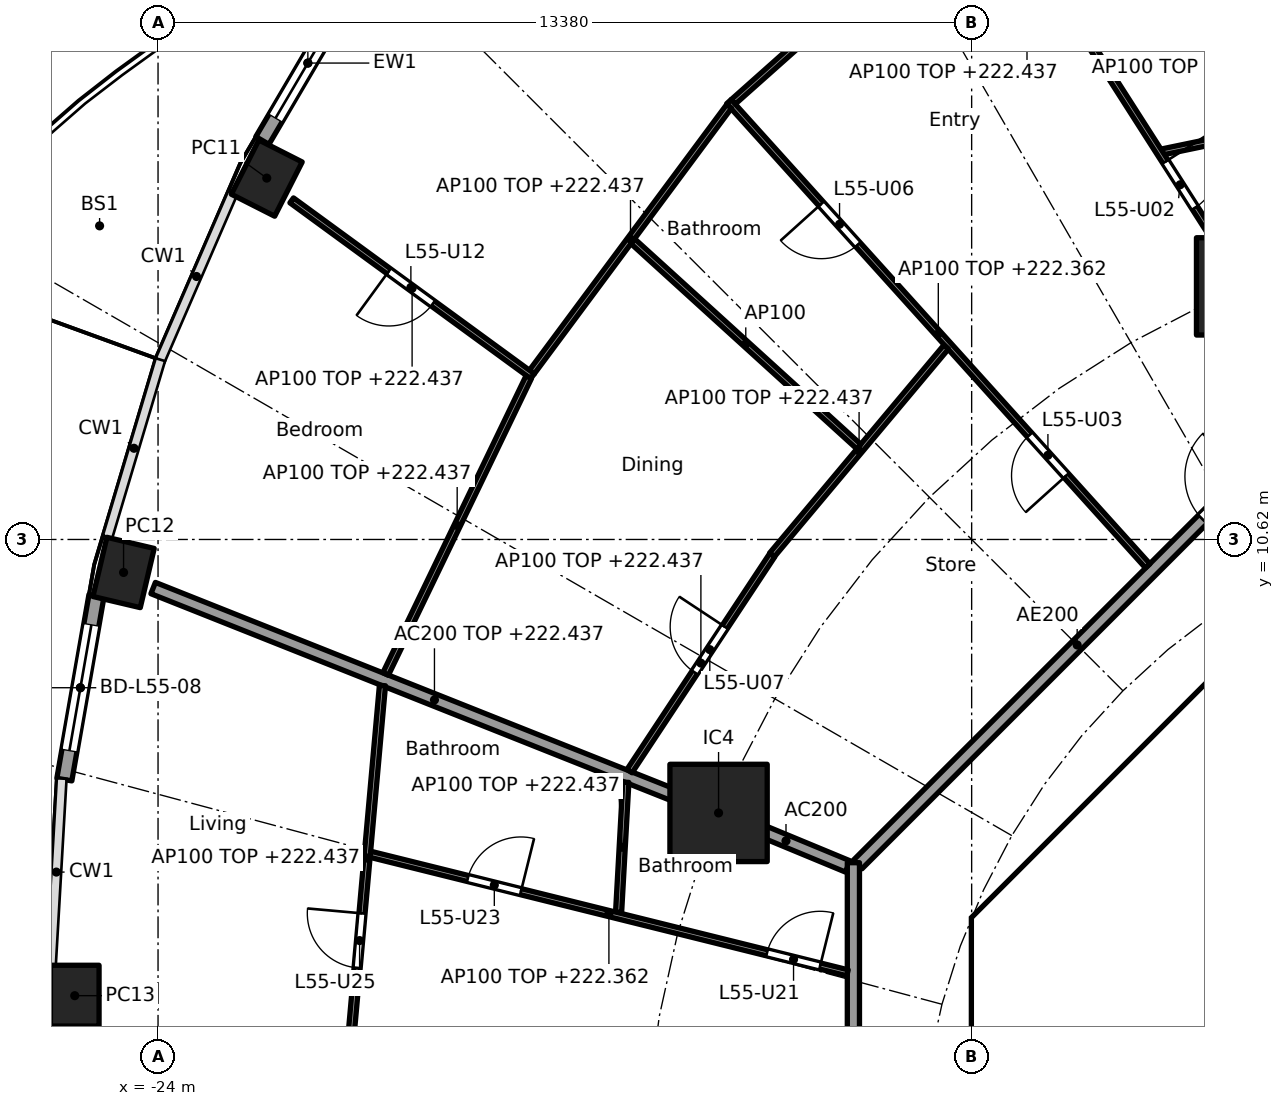
"""IFC4 building model, lengths in metres.
Left out: names, types, materials, properties, quantities, classifications, styles, units other than length and angle.
Written with IfcOpenShell. Run it as: python <this file> out.ifc"""

import sys

from ifc_helpers import new_model, si_unit, direction, frame, frame_2d, origin, origin_2d, place, context, subcontext, project, spatial, polyline, rectangle, hollow_rectangle, outline, extrude, element, fill, save


model = new_model("IFC4")
c1 = context("Model", 3, precision=1e-05, world=origin(), true_north=direction((0.0, 1.0)))
c2 = subcontext(c1, "Body", "Model", "MODEL_VIEW")
j1 = project(units=[si_unit("LENGTHUNIT", "METRE"), si_unit("PLANEANGLEUNIT", "RADIAN")], contexts=[c1])
p1 = place(None, origin())
s1 = spatial("IfcSite", under=j1, at=p1, CompositionType="ELEMENT")
p2 = place(p1, origin())
s2 = spatial("IfcBuilding", under=s1, at=p2, CompositionType="ELEMENT")
p3 = place(p2, frame((0.0, 0.0, 219.6)))
s3 = spatial("IfcBuildingStorey", under=s2, at=p3, CompositionType="ELEMENT", Elevation=219.6)
for number, where, z_axis, x_axis in (
    (1, (-22.212, 16.563, 0.0), (0.0, 0.0, 1.0), (-0.452, -0.892, 0.0)),
    (2, (-24.567, 10.077, 0.0), (0.0, 0.0, 1.0), (-0.229, -0.973, 0.0)),
    (3, (-25.37, 3.118, 0.0), (0.0, 0.0, 1.0), (0.0, -1.0, 0.0)),
):
    element("IfcColumn", number, at=place(p3, frame(where, z_axis=z_axis, x_axis=x_axis)), inside=s3, PredefinedType="COLUMN", context=c2, shape_type="SweptSolid", body=[
        extrude(hollow_rectangle(XDim=1.0, YDim=0.8, WallThickness=0.032, at=origin_2d()), origin(), (0.0, 0.0, 1.0), 3.7),
    ])
for number, where, z_axis, x_axis in (
    (4, (-6.123, 14.782, 0.0), (0.0, 0.0, 1.0), (1.0, 0.0, 0.0)),
    (5, (-14.782, 6.123, 0.0), (0.0, 0.0, 1.0), (1.0, 0.0, 0.0)),
):
    element("IfcColumn", number, at=place(p3, frame(where, z_axis=z_axis, x_axis=x_axis)), inside=s3, PredefinedType="COLUMN", context=c2, shape_type="SweptSolid", body=[
        extrude(rectangle(XDim=1.6, YDim=1.6, at=origin_2d()), origin(), (0.0, 0.0, 1.0), 3.7),
    ])
p4 = place(p3, frame((-22.284, 17.181, 0.0), z_axis=(0.0, 0.0, 1.0), x_axis=(0.506330171469, 0.862339699573, 0.0)))
e6 = element("IfcWall", 6, at=p4, inside=s3, PredefinedType="SOLIDWALL", context=c2, shape_type="SweptSolid", body=[
    extrude(rectangle(XDim=2.954, YDim=0.25, at=frame_2d((1.477, 0.0))), origin(), (0.0, 0.0, 1.0), 3.44),
])
p5 = place(p4, frame((0.427, 0.0, 0.0)))
e7 = element("IfcOpeningElement", 7, at=p5, cuts=e6, PredefinedType="OPENING", context=c2, shape_type="SweptSolid", body=[
    extrude(rectangle(XDim=2.1, YDim=2.4, at=frame_2d((1.05, 1.2))), frame((0.0, 0.135, 0.0), z_axis=(0.0, -1.0, 0.0), x_axis=(1.0, 0.0, 0.0)), (0.0, 0.0, 1.0), 0.27),
])
p6 = place(p3, frame((-25.541, 6.671, 0.0), z_axis=(0.0, 0.0, 1.0), x_axis=(0.172254823677, 0.985052422828, 0.0)))
e8 = element("IfcWall", 8, at=p6, inside=s3, PredefinedType="SOLIDWALL", context=c2, shape_type="SweptSolid", body=[
    extrude(rectangle(XDim=3.067, YDim=0.25, at=frame_2d((1.534, 0.0))), origin(), (0.0, 0.0, 1.0), 3.44),
])
p7 = place(p6, frame((0.484, 0.0, 0.0)))
e9 = element("IfcOpeningElement", 9, at=p7, cuts=e8, PredefinedType="OPENING", context=c2, shape_type="SweptSolid", body=[
    extrude(rectangle(XDim=2.1, YDim=2.4, at=frame_2d((1.05, 1.2))), frame((0.0, 0.135, 0.0), z_axis=(0.0, -1.0, 0.0), x_axis=(1.0, 0.0, 0.0)), (0.0, 0.0, 1.0), 0.27),
])
p8 = place(p3, frame((-4.613, 9.988, 0.0), z_axis=(0.0, 0.0, 1.0), x_axis=(-0.707106781187, -0.707106781187, 0.0)))
e10 = element("IfcWall", 10, at=p8, inside=s3, PredefinedType="SHEAR", context=c2, shape_type="SweptSolid", body=[
    extrude(rectangle(XDim=7.602, YDim=0.6, at=frame_2d((3.801, 0.0))), origin(), (0.0, 0.0, 1.0), 3.44),
])
p9 = place(p8, frame((0.351, 0.0, 0.0)))
e11 = element("IfcOpeningElement", 11, at=p9, cuts=e10, PredefinedType="OPENING", context=c2, shape_type="SweptSolid", body=[
    extrude(rectangle(XDim=1.1, YDim=2.1, at=frame_2d((0.55, 1.05))), frame((0.0, 0.31, 0.0), z_axis=(0.0, -1.0, 0.0), x_axis=(1.0, 0.0, 0.0)), (0.0, 0.0, 1.0), 0.62),
])
p10 = place(p3, frame((-10.325, 3.801, 0.0), z_axis=(0.0, 0.0, 1.0), x_axis=(0.0, -1.0, 0.0)))
e12 = element("IfcWall", 12, at=p10, inside=s3, PredefinedType="SHEAR", context=c2, shape_type="SweptSolid", body=[
    extrude(rectangle(XDim=7.602, YDim=0.6, at=frame_2d((3.801, 0.0))), origin(), (0.0, 0.0, 1.0), 3.44),
])
p11 = place(p10, frame((0.651, 0.0, 0.0)))
e13 = element("IfcOpeningElement", 13, at=p11, cuts=e12, PredefinedType="OPENING", context=c2, shape_type="SweptSolid", body=[
    extrude(rectangle(XDim=1.5, YDim=2.1, at=frame_2d((0.75, 1.05))), frame((0.0, 0.31, 0.0), z_axis=(0.0, -1.0, 0.0), x_axis=(1.0, 0.0, 0.0)), (0.0, 0.0, 1.0), 0.62),
])
p12 = place(p10, frame((5.451, 0.0, 0.0)))
e14 = element("IfcOpeningElement", 14, at=p12, cuts=e12, PredefinedType="OPENING", context=c2, shape_type="SweptSolid", body=[
    extrude(rectangle(XDim=1.5, YDim=2.1, at=frame_2d((0.75, 1.05))), frame((0.0, 0.31, 0.0), z_axis=(0.0, -1.0, 0.0), x_axis=(1.0, 0.0, 0.0)), (0.0, 0.0, 1.0), 0.62),
])
p13 = place(p3, origin())
e15 = element("IfcWall", 15, at=p13, inside=s3, PredefinedType="SHEAR", context=c2, shape_type="SweptSolid", body=[
    extrude(outline(polyline([(-10.2, 4.825), (-9.776, 4.401), (-10.025, 4.152), (-10.025, 3.801), (-10.625, 3.801), (-10.625, 4.401), (-10.2, 4.825)])), origin(), (0.0, 0.0, 1.0), 3.44),
])
p14 = place(p3, frame((-10.025, 4.0, 0.0), z_axis=(0.0, 0.0, 1.0), x_axis=(1.0, 0.0, 0.0)))
e16 = element("IfcWall", 16, at=p14, inside=s3, PredefinedType="PARTITIONING", context=c2, shape_type="SweptSolid", body=[
    extrude(rectangle(XDim=3.325, YDim=0.2, at=frame_2d((1.662, 0.0))), origin(), (0.0, 0.0, 1.0), 3.44),
])
p15 = place(p3, frame((-8.301, 5.8, 0.0), z_axis=(0.0, 0.0, 1.0), x_axis=(1.0, 0.0, 0.0)))
e17 = element("IfcWall", 17, at=p15, inside=s3, PredefinedType="PARTITIONING", context=c2, shape_type="SweptSolid", body=[
    extrude(rectangle(XDim=2.026, YDim=0.15, at=frame_2d((1.013, 0.0))), origin(), (0.0, 0.0, 1.0), 3.44),
])
p16 = place(p3, frame((-12.657, 5.243, 0.0), z_axis=(0.0, 0.0, 1.0), x_axis=(-0.923859888513, 0.38273085373, 0.0)))
e18 = element("IfcWall", 18, at=p16, inside=s3, PredefinedType="PARTITIONING", context=c2, shape_type="SweptSolid", body=[
    extrude(rectangle(XDim=2.199, YDim=0.2, at=frame_2d((1.1, 0.0))), origin(), (0.0, 0.0, 1.0), 3.44),
])
p17 = place(p3, frame((-14.829, 6.141, 0.0), z_axis=(0.0, 0.0, 1.0), x_axis=(-0.929202069098, 0.36957206981, 0.0)))
e19 = element("IfcWall", 19, at=p17, inside=s3, PredefinedType="PARTITIONING", context=c2, shape_type="SweptSolid", body=[
    extrude(rectangle(XDim=9.957, YDim=0.2, at=frame_2d((4.978, 0.0))), origin(), (0.0, 0.0, 1.0), 2.837),
])
p18 = place(p3, frame((-5.275, 12.494, 0.0), z_axis=(0.0, 0.0, 1.0), x_axis=(-0.707106781187, -0.707106781187, 0.0)))
e20 = element("IfcWall", 20, at=p18, inside=s3, PredefinedType="PARTITIONING", context=c2, shape_type="SweptSolid", body=[
    extrude(rectangle(XDim=10.209, YDim=0.2, at=frame_2d((5.104, 0.0))), origin(), (0.0, 0.0, 1.0), 3.44),
])
p19 = place(p18, frame((1.185, 0.0, 0.0)))
e21 = element("IfcOpeningElement", 21, at=p19, cuts=e20, PredefinedType="OPENING", context=c2, shape_type="SweptSolid", body=[
    extrude(rectangle(XDim=1.0, YDim=2.1, at=frame_2d((0.5, 1.05))), frame((0.0, 0.11, 0.0), z_axis=(0.0, -1.0, 0.0), x_axis=(1.0, 0.0, 0.0)), (0.0, 0.0, 1.0), 0.22),
])
p20 = place(p3, frame((-12.565, 5.304, 0.0), z_axis=(0.0, 0.0, 1.0), x_axis=(0.0, -1.0, 0.0)))
e22 = element("IfcWall", 22, at=p20, inside=s3, PredefinedType="PARTITIONING", context=c2, shape_type="SweptSolid", body=[
    extrude(rectangle(XDim=10.409, YDim=0.2, at=frame_2d((5.205, 0.0))), origin(), (0.0, 0.0, 1.0), 3.44),
])
p21 = place(p20, frame((3.07, 0.0, 0.0)))
e23 = element("IfcOpeningElement", 23, at=p21, cuts=e22, PredefinedType="OPENING", context=c2, shape_type="SweptSolid", body=[
    extrude(rectangle(XDim=1.0, YDim=2.1, at=frame_2d((0.5, 1.05))), frame((0.0, 0.11, 0.0), z_axis=(0.0, -1.0, 0.0), x_axis=(1.0, 0.0, 0.0)), (0.0, 0.0, 1.0), 0.22),
])
p22 = place(p3, frame((-4.215, 17.62, 0.0), z_axis=(0.0, 0.0, 1.0), x_axis=(-0.303985237897, 0.952676742206, 0.0)))
e24 = element("IfcWall", 24, at=p22, inside=s3, PredefinedType="PARTITIONING", context=c2, shape_type="SweptSolid", body=[
    extrude(rectangle(XDim=11.499, YDim=0.1, at=frame_2d((5.75, 0.0))), origin(), (0.0, 0.0, 1.0), 2.837),
])
p23 = place(p22, frame((2.457, 0.0, 0.0)))
e25 = element("IfcOpeningElement", 25, at=p23, cuts=e24, PredefinedType="OPENING", context=c2, shape_type="SweptSolid", body=[
    extrude(rectangle(XDim=0.9, YDim=2.1, at=frame_2d((0.45, 1.05))), frame((0.0, 0.06, 0.0), z_axis=(0.0, -1.0, 0.0), x_axis=(1.0, 0.0, 0.0)), (0.0, 0.0, 1.0), 0.12),
])
p24 = place(p22, frame((8.181, 0.0, 0.0)))
e26 = element("IfcOpeningElement", 26, at=p24, cuts=e24, PredefinedType="OPENING", context=c2, shape_type="SweptSolid", body=[
    extrude(rectangle(XDim=0.9, YDim=2.1, at=frame_2d((0.45, 1.05))), frame((0.0, 0.06, 0.0), z_axis=(0.0, -1.0, 0.0), x_axis=(1.0, 0.0, 0.0)), (0.0, 0.0, 1.0), 0.12),
])
p25 = place(p3, frame((-4.28, 17.657, 0.0), z_axis=(0.0, 0.0, 1.0), x_axis=(-0.979205232861, -0.202872156637, 0.0)))
e27 = element("IfcWall", 27, at=p25, inside=s3, PredefinedType="PARTITIONING", context=c2, shape_type="SweptSolid", body=[
    extrude(rectangle(XDim=3.271, YDim=0.1, at=frame_2d((1.635, 0.0))), origin(), (0.0, 0.0, 1.0), 2.837),
])
p26 = place(p3, frame((-6.15, 14.824, 0.0), z_axis=(0.0, 0.0, 1.0), x_axis=(-0.538870687577, 0.842388498301, 0.0)))
e28 = element("IfcWall", 28, at=p26, inside=s3, PredefinedType="PARTITIONING", context=c2, shape_type="SweptSolid", body=[
    extrude(rectangle(XDim=13.213, YDim=0.1, at=frame_2d((6.606, 0.0))), origin(), (0.0, 0.0, 1.0), 2.837),
])
p27 = place(p26, frame((1.483, 0.0, 0.0)))
e29 = element("IfcOpeningElement", 29, at=p27, cuts=e28, PredefinedType="OPENING", context=c2, shape_type="SweptSolid", body=[
    extrude(rectangle(XDim=0.9, YDim=2.1, at=frame_2d((0.45, 1.05))), frame((0.0, 0.06, 0.0), z_axis=(0.0, -1.0, 0.0), x_axis=(1.0, 0.0, 0.0)), (0.0, 0.0, 1.0), 0.12),
])
p28 = place(p3, frame((-10.45, 21.455, 0.0), z_axis=(0.0, 0.0, 1.0), x_axis=(-0.747150931973, -0.66465441009, 0.0)))
e30 = element("IfcWall", 30, at=p28, inside=s3, PredefinedType="PARTITIONING", context=c2, shape_type="SweptSolid", body=[
    extrude(rectangle(XDim=5.475, YDim=0.1, at=frame_2d((2.737, 0.0))), origin(), (0.0, 0.0, 1.0), 2.837),
])
p29 = place(p28, frame((2.288, 0.0, 0.0)))
e31 = element("IfcOpeningElement", 31, at=p29, cuts=e30, PredefinedType="OPENING", context=c2, shape_type="SweptSolid", body=[
    extrude(rectangle(XDim=0.9, YDim=2.1, at=frame_2d((0.45, 1.05))), frame((0.0, 0.06, 0.0), z_axis=(0.0, -1.0, 0.0), x_axis=(1.0, 0.0, 0.0)), (0.0, 0.0, 1.0), 0.12),
])
p30 = place(p3, frame((-7.725, 10.186, 0.0), z_axis=(0.0, 0.0, 1.0), x_axis=(-0.669819599194, 0.742523874725, 0.0)))
e32 = element("IfcWall", 32, at=p30, inside=s3, PredefinedType="PARTITIONING", context=c2, shape_type="SweptSolid", body=[
    extrude(rectangle(XDim=10.282, YDim=0.1, at=frame_2d((5.141, 0.0))), origin(), (0.0, 0.0, 1.0), 2.762),
])
p31 = place(p30, frame((2.0, 0.0, 0.0)))
e33 = element("IfcOpeningElement", 33, at=p31, cuts=e32, PredefinedType="OPENING", context=c2, shape_type="SweptSolid", body=[
    extrude(rectangle(XDim=0.9, YDim=2.1, at=frame_2d((0.45, 1.05))), frame((0.0, 0.06, 0.0), z_axis=(0.0, -1.0, 0.0), x_axis=(1.0, 0.0, 0.0)), (0.0, 0.0, 1.0), 0.12),
])
p32 = place(p30, frame((7.116, 0.0, 0.0)))
e34 = element("IfcOpeningElement", 34, at=p32, cuts=e32, PredefinedType="OPENING", context=c2, shape_type="SweptSolid", body=[
    extrude(rectangle(XDim=0.9, YDim=2.1, at=frame_2d((0.45, 1.05))), frame((0.0, 0.06, 0.0), z_axis=(0.0, -1.0, 0.0), x_axis=(1.0, 0.0, 0.0)), (0.0, 0.0, 1.0), 0.12),
])
p33 = place(p3, frame((-11.039, 13.785, 0.0), z_axis=(0.0, 0.0, 1.0), x_axis=(-0.642254625966, -0.766491353784, 0.0)))
e35 = element("IfcWall", 35, at=p33, inside=s3, PredefinedType="PARTITIONING", context=c2, shape_type="SweptSolid", body=[
    extrude(rectangle(XDim=4.461, YDim=0.1, at=frame_2d((2.23, 0.0))), origin(), (0.0, 0.0, 1.0), 2.837),
])
p34 = place(p3, frame((-14.608, 17.743, 0.0), z_axis=(0.0, 0.0, 1.0), x_axis=(-0.596174489482, -0.8028548923, 0.0)))
e36 = element("IfcWall", 36, at=p34, inside=s3, PredefinedType="PARTITIONING", context=c2, shape_type="SweptSolid", body=[
    extrude(rectangle(XDim=5.442, YDim=0.1, at=frame_2d((2.721, 0.0))), origin(), (0.0, 0.0, 1.0), 2.837),
])
p35 = place(p3, frame((-12.476, 12.147, 0.0), z_axis=(0.0, 0.0, 1.0), x_axis=(-0.740129203525, 0.672464692077, 0.0)))
e37 = element("IfcWall", 37, at=p35, inside=s3, PredefinedType="PARTITIONING", context=c2, shape_type="SweptSolid", body=[
    extrude(rectangle(XDim=5.022, YDim=0.1, at=frame_2d((2.511, 0.0))), origin(), (0.0, 0.0, 1.0), 3.44),
])
p36 = place(p3, frame((-13.899, 10.363, 0.0), z_axis=(0.0, 0.0, 1.0), x_axis=(-0.551267958114, -0.834328255758, 0.0)))
e38 = element("IfcWall", 38, at=p36, inside=s3, PredefinedType="PARTITIONING", context=c2, shape_type="SweptSolid", body=[
    extrude(rectangle(XDim=4.257, YDim=0.1, at=frame_2d((2.129, 0.0))), origin(), (0.0, 0.0, 1.0), 2.837),
])
p37 = place(p36, frame((1.413, 0.0, 0.0)))
e39 = element("IfcOpeningElement", 39, at=p37, cuts=e38, PredefinedType="OPENING", context=c2, shape_type="SweptSolid", body=[
    extrude(rectangle(XDim=0.9, YDim=2.1, at=frame_2d((0.45, 1.05))), frame((0.0, 0.06, 0.0), z_axis=(0.0, -1.0, 0.0), x_axis=(1.0, 0.0, 0.0)), (0.0, 0.0, 1.0), 0.12),
])
p38 = place(p3, frame((-17.842, 13.304, 0.0), z_axis=(0.0, 0.0, 1.0), x_axis=(-0.807541617862, 0.589810592835, 0.0)))
e40 = element("IfcWall", 40, at=p38, inside=s3, PredefinedType="PARTITIONING", context=c2, shape_type="SweptSolid", body=[
    extrude(rectangle(XDim=4.903, YDim=0.1, at=frame_2d((2.452, 0.0))), origin(), (0.0, 0.0, 1.0), 2.837),
])
p39 = place(p38, frame((2.027, 0.0, 0.0)))
e41 = element("IfcOpeningElement", 41, at=p39, cuts=e40, PredefinedType="OPENING", context=c2, shape_type="SweptSolid", body=[
    extrude(rectangle(XDim=0.9, YDim=2.1, at=frame_2d((0.45, 1.05))), frame((0.0, 0.06, 0.0), z_axis=(0.0, -1.0, 0.0), x_axis=(1.0, 0.0, 0.0)), (0.0, 0.0, 1.0), 0.12),
])
p40 = place(p3, frame((-17.904, 13.289, 0.0), z_axis=(0.0, 0.0, 1.0), x_axis=(-0.43429918566, -0.900768681369, 0.0)))
e42 = element("IfcWall", 42, at=p40, inside=s3, PredefinedType="PARTITIONING", context=c2, shape_type="SweptSolid", body=[
    extrude(rectangle(XDim=5.418, YDim=0.1, at=frame_2d((2.709, 0.0))), origin(), (0.0, 0.0, 1.0), 2.837),
])
p41 = place(p3, frame((-16.307, 6.627, 0.0), z_axis=(0.0, 0.0, 1.0), x_axis=(-0.055608865939, -0.998452629837, 0.0)))
e43 = element("IfcWall", 43, at=p41, inside=s3, PredefinedType="PARTITIONING", context=c2, shape_type="SweptSolid", body=[
    extrude(rectangle(XDim=2.143, YDim=0.1, at=frame_2d((1.071, 0.0))), origin(), (0.0, 0.0, 1.0), 2.837),
])
p42 = place(p3, frame((-20.31, 8.218, 0.0), z_axis=(0.0, 0.0, 1.0), x_axis=(-0.089284106956, -0.996006198899, 0.0)))
e44 = element("IfcWall", 44, at=p42, inside=s3, PredefinedType="PARTITIONING", context=c2, shape_type="SweptSolid", body=[
    extrude(rectangle(XDim=5.698, YDim=0.1, at=frame_2d((2.849, 0.0))), origin(), (0.0, 0.0, 1.0), 2.837),
])
p43 = place(p42, frame((3.761, 0.0, 0.0)))
e45 = element("IfcOpeningElement", 45, at=p43, cuts=e44, PredefinedType="OPENING", context=c2, shape_type="SweptSolid", body=[
    extrude(rectangle(XDim=0.9, YDim=2.1, at=frame_2d((0.45, 1.05))), frame((0.0, 0.06, 0.0), z_axis=(0.0, -1.0, 0.0), x_axis=(1.0, 0.0, 0.0)), (0.0, 0.0, 1.0), 0.12),
])
p44 = place(p3, frame((-12.662, 3.494, 0.0), z_axis=(0.0, 0.0, 1.0), x_axis=(-0.970505526029, 0.241078874951, 0.0)))
e46 = element("IfcWall", 46, at=p44, inside=s3, PredefinedType="PARTITIONING", context=c2, shape_type="SweptSolid", body=[
    extrude(rectangle(XDim=8.085, YDim=0.1, at=frame_2d((4.043, 0.0))), origin(), (0.0, 0.0, 1.0), 2.762),
])
p45 = place(p44, frame((0.464, 0.0, 0.0)))
e47 = element("IfcOpeningElement", 47, at=p45, cuts=e46, PredefinedType="OPENING", context=c2, shape_type="SweptSolid", body=[
    extrude(rectangle(XDim=0.9, YDim=2.1, at=frame_2d((0.45, 1.05))), frame((0.0, 0.06, 0.0), z_axis=(0.0, -1.0, 0.0), x_axis=(1.0, 0.0, 0.0)), (0.0, 0.0, 1.0), 0.12),
])
p46 = place(p44, frame((5.535, 0.0, 0.0)))
e48 = element("IfcOpeningElement", 48, at=p46, cuts=e46, PredefinedType="OPENING", context=c2, shape_type="SweptSolid", body=[
    extrude(rectangle(XDim=0.9, YDim=2.1, at=frame_2d((0.45, 1.05))), frame((0.0, 0.06, 0.0), z_axis=(0.0, -1.0, 0.0), x_axis=(1.0, 0.0, 0.0)), (0.0, 0.0, 1.0), 0.12),
])
p47 = place(p5, origin())
e49 = element("IfcDoor", 49, at=p47, inside=s3, OperationType="SLIDING_TO_LEFT", PredefinedType="DOOR", context=c2, shape_type="SweptSolid", body=[
    extrude(rectangle(XDim=2.1, YDim=2.4, at=frame_2d((1.05, 1.2))), frame((0.0, 0.025, 0.0), z_axis=(0.0, -1.0, 0.0), x_axis=(1.0, 0.0, 0.0)), (0.0, 0.0, 1.0), 0.05),
])
fill(e7, e49)
p48 = place(p7, origin())
e50 = element("IfcDoor", 50, at=p48, inside=s3, OperationType="SLIDING_TO_LEFT", PredefinedType="DOOR", context=c2, shape_type="SweptSolid", body=[
    extrude(rectangle(XDim=2.1, YDim=2.4, at=frame_2d((1.05, 1.2))), frame((0.0, 0.025, 0.0), z_axis=(0.0, -1.0, 0.0), x_axis=(1.0, 0.0, 0.0)), (0.0, 0.0, 1.0), 0.05),
])
fill(e9, e50)
p49 = place(p11, origin())
e51 = element("IfcDoor", 51, at=p49, inside=s3, OperationType="DOUBLE_DOOR_SINGLE_SWING", PredefinedType="DOOR", context=c2, shape_type="SweptSolid", body=[
    extrude(rectangle(XDim=1.5, YDim=2.1, at=frame_2d((0.75, 1.05))), frame((0.0, 0.025, 0.0), z_axis=(0.0, -1.0, 0.0), x_axis=(1.0, 0.0, 0.0)), (0.0, 0.0, 1.0), 0.05),
])
fill(e13, e51)
p50 = place(p19, frame((1.0, 0.0, 0.0), x_axis=(-1.0, 0.0, 0.0)))
e52 = element("IfcDoor", 52, at=p50, inside=s3, OperationType="SINGLE_SWING_RIGHT", PredefinedType="DOOR", context=c2, shape_type="SweptSolid", body=[
    extrude(rectangle(XDim=1.0, YDim=2.1, at=frame_2d((0.5, 1.05))), frame((0.0, 0.025, 0.0), z_axis=(0.0, -1.0, 0.0), x_axis=(1.0, 0.0, 0.0)), (0.0, 0.0, 1.0), 0.05),
])
fill(e21, e52)
p51 = place(p27, frame((0.9, 0.0, 0.0), x_axis=(-1.0, 0.0, 0.0)))
e53 = element("IfcDoor", 53, at=p51, inside=s3, OperationType="SINGLE_SWING_LEFT", PredefinedType="DOOR", context=c2, shape_type="SweptSolid", body=[
    extrude(rectangle(XDim=0.9, YDim=2.1, at=frame_2d((0.45, 1.05))), frame((0.0, 0.025, 0.0), z_axis=(0.0, -1.0, 0.0), x_axis=(1.0, 0.0, 0.0)), (0.0, 0.0, 1.0), 0.05),
])
fill(e29, e53)
p52 = place(p31, origin())
e54 = element("IfcDoor", 54, at=p52, inside=s3, OperationType="SINGLE_SWING_LEFT", PredefinedType="DOOR", context=c2, shape_type="SweptSolid", body=[
    extrude(rectangle(XDim=0.9, YDim=2.1, at=frame_2d((0.45, 1.05))), frame((0.0, 0.025, 0.0), z_axis=(0.0, -1.0, 0.0), x_axis=(1.0, 0.0, 0.0)), (0.0, 0.0, 1.0), 0.05),
])
fill(e33, e54)
p53 = place(p32, origin())
e55 = element("IfcDoor", 55, at=p53, inside=s3, OperationType="SINGLE_SWING_RIGHT", PredefinedType="DOOR", context=c2, shape_type="SweptSolid", body=[
    extrude(rectangle(XDim=0.9, YDim=2.1, at=frame_2d((0.45, 1.05))), frame((0.0, 0.025, 0.0), z_axis=(0.0, -1.0, 0.0), x_axis=(1.0, 0.0, 0.0)), (0.0, 0.0, 1.0), 0.05),
])
fill(e34, e55)
p54 = place(p37, frame((0.9, 0.0, 0.0), x_axis=(-1.0, 0.0, 0.0)))
e56 = element("IfcDoor", 56, at=p54, inside=s3, OperationType="SINGLE_SWING_RIGHT", PredefinedType="DOOR", context=c2, shape_type="SweptSolid", body=[
    extrude(rectangle(XDim=0.9, YDim=2.1, at=frame_2d((0.45, 1.05))), frame((0.0, 0.025, 0.0), z_axis=(0.0, -1.0, 0.0), x_axis=(1.0, 0.0, 0.0)), (0.0, 0.0, 1.0), 0.05),
])
fill(e39, e56)
p55 = place(p39, origin())
e57 = element("IfcDoor", 57, at=p55, inside=s3, OperationType="SINGLE_SWING_RIGHT", PredefinedType="DOOR", context=c2, shape_type="SweptSolid", body=[
    extrude(rectangle(XDim=0.9, YDim=2.1, at=frame_2d((0.45, 1.05))), frame((0.0, 0.025, 0.0), z_axis=(0.0, -1.0, 0.0), x_axis=(1.0, 0.0, 0.0)), (0.0, 0.0, 1.0), 0.05),
])
fill(e41, e57)
p56 = place(p45, frame((0.9, 0.0, 0.0), x_axis=(-1.0, 0.0, 0.0)))
e58 = element("IfcDoor", 58, at=p56, inside=s3, OperationType="SINGLE_SWING_RIGHT", PredefinedType="DOOR", context=c2, shape_type="SweptSolid", body=[
    extrude(rectangle(XDim=0.9, YDim=2.1, at=frame_2d((0.45, 1.05))), frame((0.0, 0.025, 0.0), z_axis=(0.0, -1.0, 0.0), x_axis=(1.0, 0.0, 0.0)), (0.0, 0.0, 1.0), 0.05),
])
fill(e47, e58)
p57 = place(p46, frame((0.9, 0.0, 0.0), x_axis=(-1.0, 0.0, 0.0)))
e59 = element("IfcDoor", 59, at=p57, inside=s3, OperationType="SINGLE_SWING_RIGHT", PredefinedType="DOOR", context=c2, shape_type="SweptSolid", body=[
    extrude(rectangle(XDim=0.9, YDim=2.1, at=frame_2d((0.45, 1.05))), frame((0.0, 0.025, 0.0), z_axis=(0.0, -1.0, 0.0), x_axis=(1.0, 0.0, 0.0)), (0.0, 0.0, 1.0), 0.05),
])
fill(e48, e59)
p58 = place(p43, frame((0.9, 0.0, 0.0), x_axis=(-1.0, 0.0, 0.0)))
e60 = element("IfcDoor", 60, at=p58, inside=s3, OperationType="SINGLE_SWING_RIGHT", PredefinedType="DOOR", context=c2, shape_type="SweptSolid", body=[
    extrude(rectangle(XDim=0.9, YDim=2.1, at=frame_2d((0.45, 1.05))), frame((0.0, 0.025, 0.0), z_axis=(0.0, -1.0, 0.0), x_axis=(1.0, 0.0, 0.0)), (0.0, 0.0, 1.0), 0.05),
])
fill(e45, e60)
save(model, sys.argv[1])
